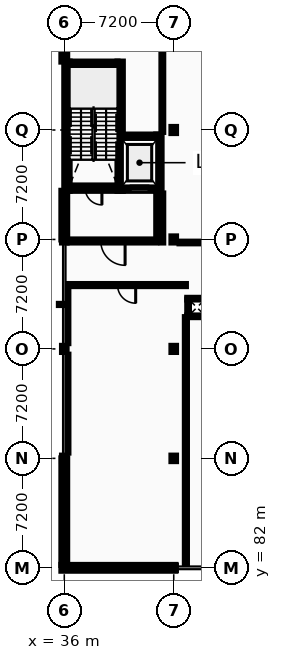
"""IFC4 building model, lengths in metres.
Left out: names, types, materials, properties, quantities, classifications, styles, units other than length and angle.
Written with IfcOpenShell. Run it as: python <this file> out.ifc"""

import sys

from ifc_helpers import new_model, si_unit, direction, frame, frame_2d, origin, origin_2d, place, context, subcontext, project, spatial, rectangle, i_section, extrude, element, fill, save


model = new_model("IFC4")
c1 = context("Model", 3, precision=1e-05, world=origin(), true_north=direction((0.0, 1.0)))
c2 = subcontext(c1, "Body", "Model", "MODEL_VIEW")
j1 = project(units=[si_unit("LENGTHUNIT", "METRE"), si_unit("PLANEANGLEUNIT", "RADIAN")], contexts=[c1])
p1 = place(None, origin())
s1 = spatial("IfcSite", under=j1, at=p1, CompositionType="ELEMENT")
p2 = place(p1, origin())
s2 = spatial("IfcBuilding", under=s1, at=p2, CompositionType="ELEMENT")
p3 = place(p2, frame((0.0, 0.0, 9.6)))
s3 = spatial("IfcBuildingStorey", under=s2, at=p3, CompositionType="ELEMENT", Elevation=9.6)
p4 = place(p3, frame((36.0, 82.0, 0.0), z_axis=(0.0, 0.0, 1.0), x_axis=(1.0, 0.0, 0.0)))
e1 = element("IfcColumn", 1, at=p4, inside=s3, PredefinedType="COLUMN", context=c2, shape_type="SweptSolid", body=[
    extrude(i_section(OverallWidth=0.28, OverallDepth=0.28, WebThickness=0.01, FlangeThickness=0.018, FilletRadius=0.024, at=origin_2d()), origin(), (0.0, 0.0, 1.0), 4.4),
])
p5 = place(p3, frame((36.0, 89.2, 0.0), z_axis=(0.0, 0.0, 1.0), x_axis=(1.0, 0.0, 0.0)))
e2 = element("IfcColumn", 2, at=p5, inside=s3, PredefinedType="COLUMN", context=c2, shape_type="SweptSolid", body=[
    extrude(i_section(OverallWidth=0.3, OverallDepth=0.36, WebThickness=0.012, FlangeThickness=0.022, FilletRadius=0.027, at=origin_2d()), origin(), (0.0, 0.0, 1.0), 4.4),
])
for number, where, z_axis, x_axis in (
    (3, (36.0, 96.4, 0.0), (0.0, 0.0, 1.0), (1.0, 0.0, 0.0)),
    (4, (36.0, 103.6, 0.0), (0.0, 0.0, 1.0), (1.0, 0.0, 0.0)),
):
    element("IfcColumn", number, at=place(p3, frame(where, z_axis=z_axis, x_axis=x_axis)), inside=s3, PredefinedType="COLUMN", context=c2, shape_type="SweptSolid", body=[
        extrude(i_section(OverallWidth=0.3, OverallDepth=0.4, WebThickness=0.013, FlangeThickness=0.024, FilletRadius=0.027, at=origin_2d()), origin(), (0.0, 0.0, 1.0), 4.4),
    ])
p6 = place(p3, frame((43.2, 82.0, 0.0), z_axis=(0.0, 0.0, 1.0), x_axis=(1.0, 0.0, 0.0)))
e5 = element("IfcColumn", 5, at=p6, inside=s3, PredefinedType="COLUMN", context=c2, shape_type="SweptSolid", body=[
    extrude(i_section(OverallWidth=0.28, OverallDepth=0.28, WebThickness=0.01, FlangeThickness=0.018, FilletRadius=0.024, at=origin_2d()), origin(), (0.0, 0.0, 1.0), 4.4),
])
p7 = place(p3, frame((43.2, 89.2, 0.0), z_axis=(0.0, 0.0, 1.0), x_axis=(1.0, 0.0, 0.0)))
e6 = element("IfcColumn", 6, at=p7, inside=s3, PredefinedType="COLUMN", context=c2, shape_type="SweptSolid", body=[
    extrude(i_section(OverallWidth=0.3, OverallDepth=0.36, WebThickness=0.012, FlangeThickness=0.022, FilletRadius=0.027, at=origin_2d()), origin(), (0.0, 0.0, 1.0), 4.4),
])
for number, where, z_axis, x_axis in (
    (7, (43.2, 96.4, 0.0), (0.0, 0.0, 1.0), (1.0, 0.0, 0.0)),
    (8, (43.2, 103.6, 0.0), (0.0, 0.0, 1.0), (1.0, 0.0, 0.0)),
    (9, (43.2, 110.8, 0.0), (0.0, 0.0, 1.0), (1.0, 0.0, 0.0)),
):
    element("IfcColumn", number, at=place(p3, frame(where, z_axis=z_axis, x_axis=x_axis)), inside=s3, PredefinedType="COLUMN", context=c2, shape_type="SweptSolid", body=[
        extrude(i_section(OverallWidth=0.3, OverallDepth=0.4, WebThickness=0.013, FlangeThickness=0.024, FilletRadius=0.027, at=origin_2d()), origin(), (0.0, 0.0, 1.0), 4.4),
    ])
p8 = place(p3, frame((35.81, 82.0, 0.0), z_axis=(0.0, 0.0, 1.0), x_axis=(1.0, 0.0, 0.0)))
e10 = element("IfcWall", 10, at=p8, inside=s3, PredefinedType="STANDARD", context=c2, shape_type="SweptSolid", body=[
    extrude(rectangle(XDim=7.5, YDim=0.38, at=frame_2d((3.75, 0.0))), origin(), (0.0, 0.0, 1.0), 3.9),
])
p9 = place(p8, frame((1.735, 0.0, 0.95)))
e11 = element("IfcOpeningElement", 11, at=p9, cuts=e10, PredefinedType="OPENING", context=c2, shape_type="SweptSolid", body=[
    extrude(rectangle(XDim=1.03, YDim=1.404, at=frame_2d((0.515, 0.702))), frame((0.0, 0.2, 0.0), z_axis=(0.0, -1.0, 0.0), x_axis=(1.0, 0.0, 0.0)), (0.0, 0.0, 1.0), 0.4),
])
p10 = place(p8, frame((4.735, 0.0, 0.95)))
e12 = element("IfcOpeningElement", 12, at=p10, cuts=e10, PredefinedType="OPENING", context=c2, shape_type="SweptSolid", body=[
    extrude(rectangle(XDim=1.03, YDim=1.404, at=frame_2d((0.515, 0.702))), frame((0.0, 0.2, 0.0), z_axis=(0.0, -1.0, 0.0), x_axis=(1.0, 0.0, 0.0)), (0.0, 0.0, 1.0), 0.4),
])
p11 = place(p3, frame((36.0, 89.2, 0.0), z_axis=(0.0, 0.0, 1.0), x_axis=(0.0, -1.0, 0.0)))
e13 = element("IfcWall", 13, at=p11, inside=s3, PredefinedType="STANDARD", context=c2, shape_type="SweptSolid", body=[
    extrude(rectangle(XDim=7.01, YDim=0.38, at=frame_2d((3.505, 0.0))), origin(), (0.0, 0.0, 1.0), 3.89),
])
p12 = place(p11, frame((1.486, 0.0, 0.95)))
e14 = element("IfcOpeningElement", 14, at=p12, cuts=e13, PredefinedType="OPENING", context=c2, shape_type="SweptSolid", body=[
    extrude(rectangle(XDim=1.234, YDim=1.404, at=frame_2d((0.617, 0.702))), frame((0.0, 0.2, 0.0), z_axis=(0.0, -1.0, 0.0), x_axis=(1.0, 0.0, 0.0)), (0.0, 0.0, 1.0), 0.4),
])
p13 = place(p11, frame((4.29, 0.0, 0.95)))
e15 = element("IfcOpeningElement", 15, at=p13, cuts=e13, PredefinedType="OPENING", context=c2, shape_type="SweptSolid", body=[
    extrude(rectangle(XDim=1.234, YDim=1.404, at=frame_2d((0.617, 0.702))), frame((0.0, 0.2, 0.0), z_axis=(0.0, -1.0, 0.0), x_axis=(1.0, 0.0, 0.0)), (0.0, 0.0, 1.0), 0.4),
])
p14 = place(p3, frame((36.0, 106.8, 0.0), z_axis=(0.0, 0.0, 1.0), x_axis=(0.0, -1.0, 0.0)))
e16 = element("IfcWall", 16, at=p14, inside=s3, PredefinedType="STANDARD", context=c2, shape_type="SweptSolid", body=[
    extrude(rectangle(XDim=3.2, YDim=0.38, at=frame_2d((1.6, 0.0))), origin(), (0.0, 0.0, 1.0), 4.2),
])
p15 = place(p14, frame((0.966, 0.0, 0.95)))
e17 = element("IfcOpeningElement", 17, at=p15, cuts=e16, PredefinedType="OPENING", context=c2, shape_type="SweptSolid", body=[
    extrude(rectangle(XDim=1.268, YDim=1.404, at=frame_2d((0.634, 0.702))), frame((0.0, 0.2, 0.0), z_axis=(0.0, -1.0, 0.0), x_axis=(1.0, 0.0, 0.0)), (0.0, 0.0, 1.0), 0.4),
])
p16 = place(p3, frame((36.0, 117.81, 0.0), z_axis=(0.0, 0.0, 1.0), x_axis=(0.0, -1.0, 0.0)))
e18 = element("IfcWall", 18, at=p16, inside=s3, PredefinedType="STANDARD", context=c2, shape_type="SweptSolid", body=[
    extrude(rectangle(XDim=2.51, YDim=0.38, at=frame_2d((1.255, 0.0))), origin(), (0.0, 0.0, 1.0), 4.2),
])
p17 = place(p3, frame((36.35, 106.975, 0.0), z_axis=(0.0, 0.0, 1.0), x_axis=(1.0, 0.0, 0.0)))
e19 = element("IfcWall", 19, at=p17, inside=s3, PredefinedType="SHEAR", context=c2, shape_type="SweptSolid", body=[
    extrude(rectangle(XDim=3.15, YDim=0.35, at=frame_2d((1.575, 0.0))), origin(), (0.0, 0.0, 1.0), 4.2),
])
p18 = place(p17, frame((1.025, 0.0, 0.0)))
e20 = element("IfcOpeningElement", 20, at=p18, cuts=e19, PredefinedType="OPENING", context=c2, shape_type="SweptSolid", body=[
    extrude(rectangle(XDim=1.1, YDim=2.15, at=frame_2d((0.55, 1.075))), frame((0.0, 0.185, 0.0), z_axis=(0.0, -1.0, 0.0), x_axis=(1.0, 0.0, 0.0)), (0.0, 0.0, 1.0), 0.37),
])
p19 = place(p3, frame((36.35, 115.125, 0.0), z_axis=(0.0, 0.0, 1.0), x_axis=(1.0, 0.0, 0.0)))
e21 = element("IfcWall", 21, at=p19, inside=s3, PredefinedType="SHEAR", context=c2, shape_type="SweptSolid", body=[
    extrude(rectangle(XDim=3.15, YDim=0.35, at=frame_2d((1.575, 0.0))), origin(), (0.0, 0.0, 1.0), 4.2),
])
for number, where, z_axis, x_axis in (
    (22, (36.175, 106.8, 0.0), (0.0, 0.0, 1.0), (0.0, 1.0, 0.0)),
    (23, (39.675, 106.8, 0.0), (0.0, 0.0, 1.0), (0.0, 1.0, 0.0)),
):
    element("IfcWall", number, at=place(p3, frame(where, z_axis=z_axis, x_axis=x_axis)), inside=s3, PredefinedType="SHEAR", context=c2, shape_type="SweptSolid", body=[
        extrude(rectangle(XDim=8.5, YDim=0.35, at=frame_2d((4.25, 0.0))), origin(), (0.0, 0.0, 1.0), 4.2),
    ])
p20 = place(p3, frame((39.85, 106.975, 0.0), z_axis=(0.0, 0.0, 1.0), x_axis=(1.0, 0.0, 0.0)))
e24 = element("IfcWall", 24, at=p20, inside=s3, PredefinedType="SHEAR", context=c2, shape_type="SweptSolid", body=[
    extrude(rectangle(XDim=2.2, YDim=0.35, at=frame_2d((1.1, 0.0))), origin(), (0.0, 0.0, 1.0), 4.2),
])
p21 = place(p20, frame((0.5, 0.0, 0.0)))
e25 = element("IfcOpeningElement", 25, at=p21, cuts=e24, PredefinedType="OPENING", context=c2, shape_type="SweptSolid", body=[
    extrude(rectangle(XDim=1.2, YDim=2.2, at=frame_2d((0.6, 1.1))), frame((0.0, 0.185, 0.0), z_axis=(0.0, -1.0, 0.0), x_axis=(1.0, 0.0, 0.0)), (0.0, 0.0, 1.0), 0.37),
])
p22 = place(p3, frame((39.85, 110.325, 0.0), z_axis=(0.0, 0.0, 1.0), x_axis=(1.0, 0.0, 0.0)))
e26 = element("IfcWall", 26, at=p22, inside=s3, PredefinedType="SHEAR", context=c2, shape_type="SweptSolid", body=[
    extrude(rectangle(XDim=2.2, YDim=0.35, at=frame_2d((1.1, 0.0))), origin(), (0.0, 0.0, 1.0), 4.2),
])
p23 = place(p3, frame((42.225, 106.8, 0.0), z_axis=(0.0, 0.0, 1.0), x_axis=(0.0, 1.0, 0.0)))
e27 = element("IfcWall", 27, at=p23, inside=s3, PredefinedType="SHEAR", context=c2, shape_type="SweptSolid", body=[
    extrude(rectangle(XDim=3.7, YDim=0.35, at=frame_2d((1.85, 0.0))), origin(), (0.0, 0.0, 1.0), 4.2),
])
p24 = place(p3, frame((36.35, 103.5, 0.0), z_axis=(0.0, 0.0, 1.0), x_axis=(1.0, 0.0, 0.0)))
e28 = element("IfcWall", 28, at=p24, inside=s3, PredefinedType="PARTITIONING", context=c2, shape_type="SweptSolid", body=[
    extrude(rectangle(XDim=5.7, YDim=0.2, at=frame_2d((2.85, 0.0))), origin(), (0.0, 0.0, 1.0), 3.895),
])
p25 = place(p24, frame((2.05, 0.0, 0.0)))
e29 = element("IfcOpeningElement", 29, at=p25, cuts=e28, PredefinedType="OPENING", context=c2, shape_type="SweptSolid", body=[
    extrude(rectangle(XDim=1.6, YDim=2.2, at=frame_2d((0.8, 1.1))), frame((0.0, 0.11, 0.0), z_axis=(0.0, -1.0, 0.0), x_axis=(1.0, 0.0, 0.0)), (0.0, 0.0, 1.0), 0.22),
])
p26 = place(p3, frame((42.15, 103.6, 0.0), z_axis=(0.0, 0.0, 1.0), x_axis=(0.0, 1.0, 0.0)))
e30 = element("IfcWall", 30, at=p26, inside=s3, PredefinedType="PARTITIONING", context=c2, shape_type="SweptSolid", body=[
    extrude(rectangle(XDim=3.2, YDim=0.2, at=frame_2d((1.6, 0.0))), origin(), (0.0, 0.0, 1.0), 4.2),
])
for number, where, z_axis, x_axis in (
    (31, (44.09, 98.545, 0.0), (0.0, 0.0, 1.0), (1.0, 0.0, 0.0)),
    (32, (44.09, 99.705, 0.0), (0.0, 0.0, 1.0), (1.0, 0.0, 0.0)),
):
    element("IfcWall", number, at=place(p3, frame(where, z_axis=z_axis, x_axis=x_axis)), inside=s3, PredefinedType="PARTITIONING", context=c2, shape_type="SweptSolid", body=[
        extrude(rectangle(XDim=1.27, YDim=0.11, at=frame_2d((0.635, 0.0))), origin(), (0.0, 0.0, 1.0), 4.2),
    ])
p27 = place(p3, frame((44.145, 98.6, 0.0), z_axis=(0.0, 0.0, 1.0), x_axis=(0.0, 1.0, 0.0)))
e33 = element("IfcWall", 33, at=p27, inside=s3, PredefinedType="PARTITIONING", context=c2, shape_type="SweptSolid", body=[
    extrude(rectangle(XDim=1.05, YDim=0.11, at=frame_2d((0.525, 0.0))), origin(), (0.0, 0.0, 1.0), 4.2),
])
p28 = place(p3, frame((36.2, 100.6, 0.0), z_axis=(0.0, 0.0, 1.0), x_axis=(1.0, 0.0, 0.0)))
e34 = element("IfcWall", 34, at=p28, inside=s3, PredefinedType="PARTITIONING", context=c2, shape_type="SweptSolid", body=[
    extrude(rectangle(XDim=7.8, YDim=0.135, at=frame_2d((3.9, 0.0))), origin(), (0.0, 0.0, 1.0), 4.2),
])
p29 = place(p28, frame((3.304, 0.0, 0.0)))
e35 = element("IfcOpeningElement", 35, at=p29, cuts=e34, PredefinedType="OPENING", context=c2, shape_type="SweptSolid", body=[
    extrude(rectangle(XDim=1.192, YDim=2.152, at=frame_2d((0.596, 1.076))), frame((0.0, 0.078, 0.0), z_axis=(0.0, -1.0, 0.0), x_axis=(1.0, 0.0, 0.0)), (0.0, 0.0, 1.0), 0.155),
])
p30 = place(p3, frame((43.58, 103.4, 0.0), z_axis=(0.0, 0.0, 1.0), x_axis=(1.0, 0.0, 0.0)))
e36 = element("IfcWall", 36, at=p30, inside=s3, PredefinedType="PARTITIONING", context=c2, shape_type="SweptSolid", body=[
    extrude(rectangle(XDim=6.44, YDim=0.11, at=frame_2d((3.22, 0.0))), origin(), (0.0, 0.0, 1.0), 3.895),
])
p31 = place(p30, frame((5.17, 0.0, 0.0)))
e37 = element("IfcOpeningElement", 37, at=p31, cuts=e36, PredefinedType="OPENING", context=c2, shape_type="SweptSolid", body=[
    extrude(rectangle(XDim=0.95, YDim=2.1, at=frame_2d((0.475, 1.05))), frame((0.0, 0.065, 0.0), z_axis=(0.0, -1.0, 0.0), x_axis=(1.0, 0.0, 0.0)), (0.0, 0.0, 1.0), 0.13),
])
p32 = place(p30, frame((3.37, 0.0, 0.0)))
e38 = element("IfcOpeningElement", 38, at=p32, cuts=e36, PredefinedType="OPENING", context=c2, shape_type="SweptSolid", body=[
    extrude(rectangle(XDim=1.15, YDim=2.15, at=frame_2d((0.575, 1.075))), frame((0.0, 0.065, 0.0), z_axis=(0.0, -1.0, 0.0), x_axis=(1.0, 0.0, 0.0)), (0.0, 0.0, 1.0), 0.13),
])
p33 = place(p3, frame((36.2, 89.58, 0.0), z_axis=(0.0, 0.0, 1.0), x_axis=(0.0, 1.0, 0.0)))
e39 = element("IfcWall", 39, at=p33, inside=s3, PredefinedType="PARTITIONING", context=c2, shape_type="SweptSolid", body=[
    extrude(rectangle(XDim=6.44, YDim=0.142, at=frame_2d((3.22, 0.0))), origin(), (0.0, 0.0, 1.0), 3.885),
])
p34 = place(p3, frame((36.2, 96.78, 0.0), z_axis=(0.0, 0.0, 1.0), x_axis=(0.0, 1.0, 0.0)))
e40 = element("IfcWall", 40, at=p34, inside=s3, PredefinedType="PARTITIONING", context=c2, shape_type="SweptSolid", body=[
    extrude(rectangle(XDim=3.752, YDim=0.135, at=frame_2d((1.876, 0.0))), origin(), (0.0, 0.0, 1.0), 3.885),
])
p35 = place(p3, frame((42.45, 103.4, 0.0), z_axis=(0.0, 0.0, 1.0), x_axis=(0.0, 1.0, 0.0)))
e41 = element("IfcWall", 41, at=p35, inside=s3, PredefinedType="PARTITIONING", context=c2, shape_type="SweptSolid", body=[
    extrude(rectangle(XDim=3.225, YDim=0.118, at=frame_2d((1.613, 0.0))), origin(), (0.0, 0.0, 1.0), 4.2),
])
p36 = place(p3, frame((42.45, 110.675, 0.0), z_axis=(0.0, 0.0, 1.0), x_axis=(0.0, 1.0, 0.0)))
e42 = element("IfcWall", 42, at=p36, inside=s3, PredefinedType="PARTITIONING", context=c2, shape_type="SweptSolid", body=[
    extrude(rectangle(XDim=7.125, YDim=0.118, at=frame_2d((3.562, 0.0))), origin(), (0.0, 0.0, 1.0), 4.2),
])
p37 = place(p3, frame((44.0, 82.2, 0.0), z_axis=(0.0, 0.0, 1.0), x_axis=(0.0, 1.0, 0.0)))
e43 = element("IfcWall", 43, at=p37, inside=s3, PredefinedType="PARTITIONING", context=c2, shape_type="SweptSolid", body=[
    extrude(rectangle(XDim=16.29, YDim=0.135, at=frame_2d((8.145, 0.0))), origin(), (0.0, 0.0, 1.0), 4.2),
])
p38 = place(p9, origin())
e44 = element("IfcWindow", 44, at=p38, inside=s3, PartitioningType="SINGLE_PANEL", PredefinedType="WINDOW", context=c2, shape_type="SweptSolid", body=[
    extrude(rectangle(XDim=1.03, YDim=1.404, at=frame_2d((0.515, 0.702))), frame((0.0, 0.03, 0.0), z_axis=(0.0, -1.0, 0.0), x_axis=(1.0, 0.0, 0.0)), (0.0, 0.0, 1.0), 0.06),
])
fill(e11, e44)
p39 = place(p10, origin())
e45 = element("IfcWindow", 45, at=p39, inside=s3, PartitioningType="SINGLE_PANEL", PredefinedType="WINDOW", context=c2, shape_type="SweptSolid", body=[
    extrude(rectangle(XDim=1.03, YDim=1.404, at=frame_2d((0.515, 0.702))), frame((0.0, 0.03, 0.0), z_axis=(0.0, -1.0, 0.0), x_axis=(1.0, 0.0, 0.0)), (0.0, 0.0, 1.0), 0.06),
])
fill(e12, e45)
p40 = place(p12, origin())
e46 = element("IfcWindow", 46, at=p40, inside=s3, PartitioningType="SINGLE_PANEL", PredefinedType="WINDOW", context=c2, shape_type="SweptSolid", body=[
    extrude(rectangle(XDim=1.234, YDim=1.404, at=frame_2d((0.617, 0.702))), frame((0.0, 0.03, 0.0), z_axis=(0.0, -1.0, 0.0), x_axis=(1.0, 0.0, 0.0)), (0.0, 0.0, 1.0), 0.06),
])
fill(e14, e46)
p41 = place(p13, origin())
e47 = element("IfcWindow", 47, at=p41, inside=s3, PartitioningType="SINGLE_PANEL", PredefinedType="WINDOW", context=c2, shape_type="SweptSolid", body=[
    extrude(rectangle(XDim=1.234, YDim=1.404, at=frame_2d((0.617, 0.702))), frame((0.0, 0.03, 0.0), z_axis=(0.0, -1.0, 0.0), x_axis=(1.0, 0.0, 0.0)), (0.0, 0.0, 1.0), 0.06),
])
fill(e15, e47)
p42 = place(p15, origin())
e48 = element("IfcWindow", 48, at=p42, inside=s3, PartitioningType="SINGLE_PANEL", PredefinedType="WINDOW", context=c2, shape_type="SweptSolid", body=[
    extrude(rectangle(XDim=1.268, YDim=1.404, at=frame_2d((0.634, 0.702))), frame((0.0, 0.03, 0.0), z_axis=(0.0, -1.0, 0.0), x_axis=(1.0, 0.0, 0.0)), (0.0, 0.0, 1.0), 0.06),
])
fill(e17, e48)
p43 = place(p18, origin())
e49 = element("IfcDoor", 49, at=p43, inside=s3, OperationType="SINGLE_SWING_RIGHT", PredefinedType="DOOR", context=c2, shape_type="SweptSolid", body=[
    extrude(rectangle(XDim=1.1, YDim=2.15, at=frame_2d((0.55, 1.075))), frame((0.0, 0.025, 0.0), z_axis=(0.0, -1.0, 0.0), x_axis=(1.0, 0.0, 0.0)), (0.0, 0.0, 1.0), 0.05),
])
fill(e20, e49)
p44 = place(p21, origin())
e50 = element("IfcDoor", 50, at=p44, inside=s3, OperationType="SLIDING_TO_RIGHT", PredefinedType="DOOR", context=c2, shape_type="SweptSolid", body=[
    extrude(rectangle(XDim=1.2, YDim=2.2, at=frame_2d((0.6, 1.1))), frame((0.0, 0.025, 0.0), z_axis=(0.0, -1.0, 0.0), x_axis=(1.0, 0.0, 0.0)), (0.0, 0.0, 1.0), 0.05),
])
fill(e25, e50)
p45 = place(p25, origin())
e51 = element("IfcDoor", 51, at=p45, inside=s3, OperationType="DOUBLE_DOOR_SINGLE_SWING", PredefinedType="DOOR", context=c2, shape_type="SweptSolid", body=[
    extrude(rectangle(XDim=1.6, YDim=2.2, at=frame_2d((0.8, 1.1))), frame((0.0, 0.025, 0.0), z_axis=(0.0, -1.0, 0.0), x_axis=(1.0, 0.0, 0.0)), (0.0, 0.0, 1.0), 0.05),
])
fill(e29, e51)
p46 = place(p29, origin())
e52 = element("IfcDoor", 52, at=p46, inside=s3, OperationType="SINGLE_SWING_RIGHT", PredefinedType="DOOR", context=c2, shape_type="SweptSolid", body=[
    extrude(rectangle(XDim=1.192, YDim=2.152, at=frame_2d((0.596, 1.076))), frame((0.0, 0.025, 0.0), z_axis=(0.0, -1.0, 0.0), x_axis=(1.0, 0.0, 0.0)), (0.0, 0.0, 1.0), 0.05),
])
fill(e35, e52)
save(model, sys.argv[1])
